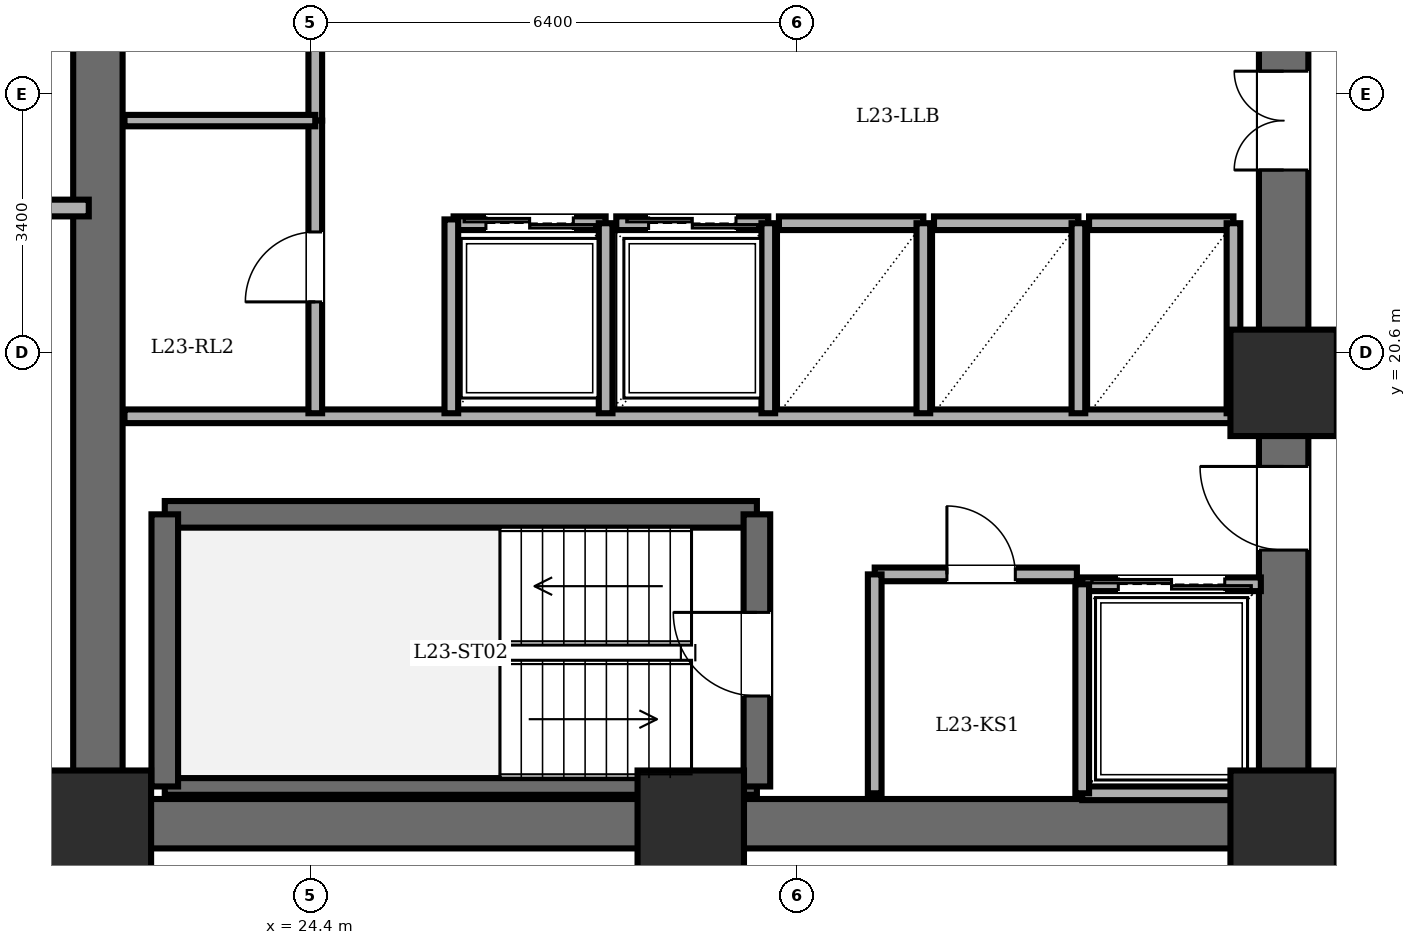
"""IFC4 building model, lengths in metres.
Left out: names, types, materials, properties, quantities, classifications, styles, units other than length and angle.
Written with IfcOpenShell. Run it as: python <this file> out.ifc"""

import sys

from ifc_helpers import new_model, si_unit, direction, frame, frame_2d, origin, origin_2d, place, context, subcontext, project, spatial, rectangle, extrude, element, fill, save


model = new_model("IFC4")
c1 = context("Model", 3, precision=1e-05, world=origin(), true_north=direction((0.0, 1.0)))
c2 = subcontext(c1, "Body", "Model", "MODEL_VIEW")
j1 = project(units=[si_unit("LENGTHUNIT", "METRE"), si_unit("PLANEANGLEUNIT", "RADIAN")], contexts=[c1])
p1 = place(None, origin())
s1 = spatial("IfcSite", under=j1, at=p1, CompositionType="ELEMENT")
p2 = place(p1, origin())
s2 = spatial("IfcBuilding", under=s1, at=p2, CompositionType="ELEMENT")
p3 = place(p2, frame((0.0, 0.0, 89.9)))
s3 = spatial("IfcBuildingStorey", under=s2, at=p3, CompositionType="ELEMENT", Elevation=89.9)
for number, where, z_axis, x_axis in (
    (1, (21.6, 14.4, 0.0), (0.0, 0.0, 1.0), (1.0, 0.0, 0.0)),
    (2, (29.4, 14.4, 0.0), (0.0, 0.0, 1.0), (1.0, 0.0, 0.0)),
    (3, (37.2, 14.4, 0.0), (0.0, 0.0, 1.0), (1.0, 0.0, 0.0)),
    (4, (37.2, 20.2, 0.0), (0.0, 0.0, 1.0), (1.0, 0.0, 0.0)),
):
    element("IfcColumn", number, at=place(p3, frame(where, z_axis=z_axis, x_axis=x_axis)), inside=s3, PredefinedType="COLUMN", context=c2, shape_type="SweptSolid", body=[
        extrude(rectangle(XDim=1.4, YDim=1.4, at=origin_2d()), origin(), (0.0, 0.0, 1.0), 3.6),
    ])
p4 = place(p3, frame((21.6, 14.4, 0.0), z_axis=(0.0, 0.0, 1.0), x_axis=(0.0, 1.0, 0.0)))
e5 = element("IfcWall", 5, at=p4, inside=s3, PredefinedType="SHEAR", context=c2, shape_type="SweptSolid", body=[
    extrude(rectangle(XDim=19.2, YDim=0.65, at=frame_2d((9.6, 0.0))), origin(), (0.0, 0.0, 1.0), 3.4),
])
p5 = place(p3, frame((37.2, 14.4, 0.0), z_axis=(0.0, 0.0, 1.0), x_axis=(-1.0, 0.0, 0.0)))
e6 = element("IfcWall", 6, at=p5, inside=s3, PredefinedType="SHEAR", context=c2, shape_type="SweptSolid", body=[
    extrude(rectangle(XDim=15.6, YDim=0.65, at=frame_2d((7.8, 0.0))), origin(), (0.0, 0.0, 1.0), 3.4),
])
p6 = place(p3, frame((37.2, 14.4, 0.0), z_axis=(0.0, 0.0, 1.0), x_axis=(0.0, 1.0, 0.0)))
e7 = element("IfcWall", 7, at=p6, inside=s3, PredefinedType="SHEAR", context=c2, shape_type="SweptSolid", body=[
    extrude(rectangle(XDim=19.2, YDim=0.65, at=frame_2d((9.6, 0.0))), origin(), (0.0, 0.0, 1.0), 3.4),
])
p7 = place(p6, frame((15.8, 0.0, 0.0)))
e8 = element("IfcOpeningElement", 8, at=p7, cuts=e7, PredefinedType="OPENING", context=c2, shape_type="SweptSolid", body=[
    extrude(rectangle(XDim=1.15, YDim=2.15, at=frame_2d((0.575, 1.075))), frame((0.0, 0.335, 0.0), z_axis=(0.0, -1.0, 0.0), x_axis=(1.0, 0.0, 0.0)), (0.0, 0.0, 1.0), 0.67),
])
p8 = place(p6, frame((3.6, 0.0, 0.0)))
e9 = element("IfcOpeningElement", 9, at=p8, cuts=e7, PredefinedType="OPENING", context=c2, shape_type="SweptSolid", body=[
    extrude(rectangle(XDim=1.1, YDim=2.15, at=frame_2d((0.55, 1.075))), frame((0.0, 0.335, 0.0), z_axis=(0.0, -1.0, 0.0), x_axis=(1.0, 0.0, 0.0)), (0.0, 0.0, 1.0), 0.67),
])
p9 = place(p6, frame((8.6, 0.0, 0.0)))
e10 = element("IfcOpeningElement", 10, at=p9, cuts=e7, PredefinedType="OPENING", context=c2, shape_type="SweptSolid", body=[
    extrude(rectangle(XDim=1.3, YDim=2.2, at=frame_2d((0.65, 1.1))), frame((0.0, 0.335, 0.0), z_axis=(0.0, -1.0, 0.0), x_axis=(1.0, 0.0, 0.0)), (0.0, 0.0, 1.0), 0.67),
])
p10 = place(p3, frame((22.48, 18.47, 0.0), z_axis=(0.0, 0.0, 1.0), x_axis=(1.0, 0.0, 0.0)))
e11 = element("IfcWall", 11, at=p10, inside=s3, PredefinedType="SOLIDWALL", context=c2, shape_type="SweptSolid", body=[
    extrude(rectangle(XDim=7.79, YDim=0.35, at=frame_2d((3.895, 0.0))), origin(), (0.0, 0.0, 1.0), 3.4),
])
p11 = place(p3, frame((22.48, 14.89, 0.0), z_axis=(0.0, 0.0, 1.0), x_axis=(1.0, 0.0, 0.0)))
e12 = element("IfcWall", 12, at=p11, inside=s3, PredefinedType="PARTITIONING", context=c2, shape_type="SweptSolid", body=[
    extrude(rectangle(XDim=7.79, YDim=0.22, at=frame_2d((3.895, 0.0))), origin(), (0.0, 0.0, 1.0), 3.4),
])
p12 = place(p3, frame((22.48, 14.89, 0.0), z_axis=(0.0, 0.0, 1.0), x_axis=(0.0, 1.0, 0.0)))
e13 = element("IfcWall", 13, at=p12, inside=s3, PredefinedType="SOLIDWALL", context=c2, shape_type="SweptSolid", body=[
    extrude(rectangle(XDim=3.58, YDim=0.35, at=frame_2d((1.79, 0.0))), origin(), (0.0, 0.0, 1.0), 3.4),
])
p13 = place(p3, frame((30.27, 14.89, 0.0), z_axis=(0.0, 0.0, 1.0), x_axis=(0.0, 1.0, 0.0)))
e14 = element("IfcWall", 14, at=p13, inside=s3, PredefinedType="SOLIDWALL", context=c2, shape_type="SweptSolid", body=[
    extrude(rectangle(XDim=3.58, YDim=0.35, at=frame_2d((1.79, 0.0))), origin(), (0.0, 0.0, 1.0), 3.4),
])
p14 = place(p13, frame((1.19, 0.0, 0.0)))
e15 = element("IfcOpeningElement", 15, at=p14, cuts=e14, PredefinedType="OPENING", context=c2, shape_type="SweptSolid", body=[
    extrude(rectangle(XDim=1.1, YDim=2.15, at=frame_2d((0.55, 1.075))), frame((0.0, 0.185, 0.0), z_axis=(0.0, -1.0, 0.0), x_axis=(1.0, 0.0, 0.0)), (0.0, 0.0, 1.0), 0.37),
])
p15 = place(p3, frame((21.95, 19.76, 0.0), z_axis=(0.0, 0.0, 1.0), x_axis=(1.0, 0.0, 0.0)))
e16 = element("IfcWall", 16, at=p15, inside=s3, PredefinedType="PARTITIONING", context=c2, shape_type="SweptSolid", body=[
    extrude(rectangle(XDim=14.87, YDim=0.18, at=frame_2d((7.435, 0.0))), origin(), (0.0, 0.0, 1.0), 3.4),
])
p16 = place(p3, frame((31.82, 17.68, 0.0), z_axis=(0.0, 0.0, 1.0), x_axis=(1.0, 0.0, 0.0)))
e17 = element("IfcWall", 17, at=p16, inside=s3, PredefinedType="PARTITIONING", context=c2, shape_type="SweptSolid", body=[
    extrude(rectangle(XDim=2.66, YDim=0.18, at=frame_2d((1.33, 0.0))), origin(), (0.0, 0.0, 1.0), 3.4),
])
p17 = place(p16, frame((0.95, 0.0, 0.0)))
e18 = element("IfcOpeningElement", 18, at=p17, cuts=e17, PredefinedType="OPENING", context=c2, shape_type="SweptSolid", body=[
    extrude(rectangle(XDim=0.9, YDim=2.05, at=frame_2d((0.45, 1.025))), frame((0.0, 0.1, 0.0), z_axis=(0.0, -1.0, 0.0), x_axis=(1.0, 0.0, 0.0)), (0.0, 0.0, 1.0), 0.2),
])
p18 = place(p3, frame((31.82, 14.8, 0.0), z_axis=(0.0, 0.0, 1.0), x_axis=(0.0, 1.0, 0.0)))
e19 = element("IfcWall", 19, at=p18, inside=s3, PredefinedType="PARTITIONING", context=c2, shape_type="SweptSolid", body=[
    extrude(rectangle(XDim=2.88, YDim=0.18, at=frame_2d((1.44, 0.0))), origin(), (0.0, 0.0, 1.0), 3.4),
])
p19 = place(p3, frame((34.55, 17.55, 0.0), z_axis=(0.0, 0.0, 1.0), x_axis=(1.0, 0.0, 0.0)))
e20 = element("IfcWall", 20, at=p19, inside=s3, PredefinedType="PARTITIONING", context=c2, shape_type="SweptSolid", body=[
    extrude(rectangle(XDim=2.35, YDim=0.18, at=frame_2d((1.175, 0.0))), origin(), (0.0, 0.0, 1.0), 3.4),
])
p20 = place(p19, frame((0.475, 0.0, 0.0)))
e21 = element("IfcOpeningElement", 21, at=p20, cuts=e20, PredefinedType="OPENING", context=c2, shape_type="SweptSolid", body=[
    extrude(rectangle(XDim=1.4, YDim=2.3, at=frame_2d((0.7, 1.15))), frame((0.0, 0.1, 0.0), z_axis=(0.0, -1.0, 0.0), x_axis=(1.0, 0.0, 0.0)), (0.0, 0.0, 1.0), 0.2),
])
p21 = place(p3, frame((36.9, 14.8, 0.0), z_axis=(0.0, 0.0, 1.0), x_axis=(-1.0, 0.0, 0.0)))
e22 = element("IfcWall", 22, at=p21, inside=s3, PredefinedType="PARTITIONING", context=c2, shape_type="SweptSolid", body=[
    extrude(rectangle(XDim=2.35, YDim=0.18, at=frame_2d((1.175, 0.0))), origin(), (0.0, 0.0, 1.0), 3.4),
])
p22 = place(p3, frame((34.55, 17.55, 0.0), z_axis=(0.0, 0.0, 1.0), x_axis=(0.0, -1.0, 0.0)))
e23 = element("IfcWall", 23, at=p22, inside=s3, PredefinedType="PARTITIONING", context=c2, shape_type="SweptSolid", body=[
    extrude(rectangle(XDim=2.75, YDim=0.18, at=frame_2d((1.375, 0.0))), origin(), (0.0, 0.0, 1.0), 3.4),
])
p23 = place(p3, frame((26.28, 22.3, 0.0), z_axis=(0.0, 0.0, 1.0), x_axis=(1.0, 0.0, 0.0)))
e24 = element("IfcWall", 24, at=p23, inside=s3, PredefinedType="PARTITIONING", context=c2, shape_type="SweptSolid", body=[
    extrude(rectangle(XDim=2.0, YDim=0.18, at=frame_2d((1.0, 0.0))), origin(), (0.0, 0.0, 1.0), 3.4),
])
p24 = place(p23, frame((0.425, 0.0, 0.0)))
e25 = element("IfcOpeningElement", 25, at=p24, cuts=e24, PredefinedType="OPENING", context=c2, shape_type="SweptSolid", body=[
    extrude(rectangle(XDim=1.15, YDim=2.2, at=frame_2d((0.575, 1.1))), frame((0.0, 0.1, 0.0), z_axis=(0.0, -1.0, 0.0), x_axis=(1.0, 0.0, 0.0)), (0.0, 0.0, 1.0), 0.2),
])
p25 = place(p3, frame((28.28, 19.8, 0.0), z_axis=(0.0, 0.0, 1.0), x_axis=(0.0, 1.0, 0.0)))
e26 = element("IfcWall", 26, at=p25, inside=s3, PredefinedType="PARTITIONING", context=c2, shape_type="SweptSolid", body=[
    extrude(rectangle(XDim=2.5, YDim=0.18, at=frame_2d((1.25, 0.0))), origin(), (0.0, 0.0, 1.0), 3.4),
])
p26 = place(p3, frame((28.42, 22.3, 0.0), z_axis=(0.0, 0.0, 1.0), x_axis=(1.0, 0.0, 0.0)))
e27 = element("IfcWall", 27, at=p26, inside=s3, PredefinedType="PARTITIONING", context=c2, shape_type="SweptSolid", body=[
    extrude(rectangle(XDim=2.0, YDim=0.18, at=frame_2d((1.0, 0.0))), origin(), (0.0, 0.0, 1.0), 3.4),
])
p27 = place(p26, frame((0.425, 0.0, 0.0)))
e28 = element("IfcOpeningElement", 28, at=p27, cuts=e27, PredefinedType="OPENING", context=c2, shape_type="SweptSolid", body=[
    extrude(rectangle(XDim=1.15, YDim=2.2, at=frame_2d((0.575, 1.1))), frame((0.0, 0.1, 0.0), z_axis=(0.0, -1.0, 0.0), x_axis=(1.0, 0.0, 0.0)), (0.0, 0.0, 1.0), 0.2),
])
p28 = place(p3, frame((30.42, 19.8, 0.0), z_axis=(0.0, 0.0, 1.0), x_axis=(0.0, 1.0, 0.0)))
e29 = element("IfcWall", 29, at=p28, inside=s3, PredefinedType="PARTITIONING", context=c2, shape_type="SweptSolid", body=[
    extrude(rectangle(XDim=2.5, YDim=0.18, at=frame_2d((1.25, 0.0))), origin(), (0.0, 0.0, 1.0), 3.4),
])
p29 = place(p3, frame((30.56, 22.3, 0.0), z_axis=(0.0, 0.0, 1.0), x_axis=(1.0, 0.0, 0.0)))
e30 = element("IfcWall", 30, at=p29, inside=s3, PredefinedType="PARTITIONING", context=c2, shape_type="SweptSolid", body=[
    extrude(rectangle(XDim=1.9, YDim=0.18, at=frame_2d((0.95, 0.0))), origin(), (0.0, 0.0, 1.0), 3.4),
])
p30 = place(p3, frame((32.46, 19.8, 0.0), z_axis=(0.0, 0.0, 1.0), x_axis=(0.0, 1.0, 0.0)))
e31 = element("IfcWall", 31, at=p30, inside=s3, PredefinedType="PARTITIONING", context=c2, shape_type="SweptSolid", body=[
    extrude(rectangle(XDim=2.5, YDim=0.18, at=frame_2d((1.25, 0.0))), origin(), (0.0, 0.0, 1.0), 3.4),
])
p31 = place(p3, frame((32.6, 22.3, 0.0), z_axis=(0.0, 0.0, 1.0), x_axis=(1.0, 0.0, 0.0)))
e32 = element("IfcWall", 32, at=p31, inside=s3, PredefinedType="PARTITIONING", context=c2, shape_type="SweptSolid", body=[
    extrude(rectangle(XDim=1.9, YDim=0.18, at=frame_2d((0.95, 0.0))), origin(), (0.0, 0.0, 1.0), 3.4),
])
p32 = place(p3, frame((34.5, 19.8, 0.0), z_axis=(0.0, 0.0, 1.0), x_axis=(0.0, 1.0, 0.0)))
e33 = element("IfcWall", 33, at=p32, inside=s3, PredefinedType="PARTITIONING", context=c2, shape_type="SweptSolid", body=[
    extrude(rectangle(XDim=2.5, YDim=0.18, at=frame_2d((1.25, 0.0))), origin(), (0.0, 0.0, 1.0), 3.4),
])
p33 = place(p3, frame((34.64, 22.3, 0.0), z_axis=(0.0, 0.0, 1.0), x_axis=(1.0, 0.0, 0.0)))
e34 = element("IfcWall", 34, at=p33, inside=s3, PredefinedType="PARTITIONING", context=c2, shape_type="SweptSolid", body=[
    extrude(rectangle(XDim=1.9, YDim=0.18, at=frame_2d((0.95, 0.0))), origin(), (0.0, 0.0, 1.0), 3.4),
])
p34 = place(p3, frame((36.54, 19.8, 0.0), z_axis=(0.0, 0.0, 1.0), x_axis=(0.0, 1.0, 0.0)))
e35 = element("IfcWall", 35, at=p34, inside=s3, PredefinedType="PARTITIONING", context=c2, shape_type="SweptSolid", body=[
    extrude(rectangle(XDim=2.5, YDim=0.18, at=frame_2d((1.25, 0.0))), origin(), (0.0, 0.0, 1.0), 3.4),
])
p35 = place(p3, frame((24.46, 23.65, 0.0), z_axis=(0.0, 0.0, 1.0), x_axis=(0.0, 1.0, 0.0)))
e36 = element("IfcWall", 36, at=p35, inside=s3, PredefinedType="PARTITIONING", context=c2, shape_type="SweptSolid", body=[
    extrude(rectangle(XDim=3.85, YDim=0.18, at=frame_2d((1.925, 0.0))), origin(), (0.0, 0.0, 1.0), 3.4),
])
p36 = place(p35, frame((1.465, 0.0, 0.0)))
e37 = element("IfcOpeningElement", 37, at=p36, cuts=e36, PredefinedType="OPENING", context=c2, shape_type="SweptSolid", body=[
    extrude(rectangle(XDim=0.92, YDim=2.1, at=frame_2d((0.46, 1.05))), frame((0.0, 0.1, 0.0), z_axis=(0.0, -1.0, 0.0), x_axis=(1.0, 0.0, 0.0)), (0.0, 0.0, 1.0), 0.2),
])
p37 = place(p3, frame((24.46, 19.8, 0.0), z_axis=(0.0, 0.0, 1.0), x_axis=(0.0, 1.0, 0.0)))
e38 = element("IfcWall", 38, at=p37, inside=s3, PredefinedType="PARTITIONING", context=c2, shape_type="SweptSolid", body=[
    extrude(rectangle(XDim=3.85, YDim=0.18, at=frame_2d((1.925, 0.0))), origin(), (0.0, 0.0, 1.0), 3.4),
])
p38 = place(p37, frame((1.465, 0.0, 0.0)))
e39 = element("IfcOpeningElement", 39, at=p38, cuts=e38, PredefinedType="OPENING", context=c2, shape_type="SweptSolid", body=[
    extrude(rectangle(XDim=0.92, YDim=2.1, at=frame_2d((0.46, 1.05))), frame((0.0, 0.1, 0.0), z_axis=(0.0, -1.0, 0.0), x_axis=(1.0, 0.0, 0.0)), (0.0, 0.0, 1.0), 0.2),
])
p39 = place(p3, frame((21.95, 23.65, 0.0), z_axis=(0.0, 0.0, 1.0), x_axis=(1.0, 0.0, 0.0)))
e40 = element("IfcWall", 40, at=p39, inside=s3, PredefinedType="PARTITIONING", context=c2, shape_type="SweptSolid", body=[
    extrude(rectangle(XDim=2.51, YDim=0.15, at=frame_2d((1.255, 0.0))), origin(), (0.0, 0.0, 1.0), 3.4),
])
p40 = place(p3, frame((26.25, 19.8, 0.0), z_axis=(0.0, 0.0, 1.0), x_axis=(0.0, 1.0, 0.0)))
e41 = element("IfcWall", 41, at=p40, inside=s3, PredefinedType="PARTITIONING", context=c2, shape_type="SweptSolid", body=[
    extrude(rectangle(XDim=2.55, YDim=0.18, at=frame_2d((1.275, 0.0))), origin(), (0.0, 0.0, 1.0), 3.4),
])
p41 = place(p3, frame((8.8, 14.18, 0.0), z_axis=(0.0, 0.0, 1.0), x_axis=(1.0, 0.0, 0.0)))
e42 = element("IfcWall", 42, at=p41, inside=s3, PredefinedType="PARTITIONING", context=c2, shape_type="SweptSolid", body=[
    extrude(rectangle(XDim=12.68, YDim=0.22, at=frame_2d((6.34, 0.0))), origin(), (0.0, 0.0, 1.0), 3.4),
])
p42 = place(p41, frame((6.18, 0.0, 0.0)))
e43 = element("IfcOpeningElement", 43, at=p42, cuts=e42, PredefinedType="OPENING", context=c2, shape_type="SweptSolid", body=[
    extrude(rectangle(XDim=1.0, YDim=2.15, at=frame_2d((0.5, 1.075))), frame((0.0, 0.12, 0.0), z_axis=(0.0, -1.0, 0.0), x_axis=(1.0, 0.0, 0.0)), (0.0, 0.0, 1.0), 0.24),
])
p43 = place(p3, frame((8.8, 22.5, 0.0), z_axis=(0.0, 0.0, 1.0), x_axis=(1.0, 0.0, 0.0)))
e44 = element("IfcWall", 44, at=p43, inside=s3, PredefinedType="PARTITIONING", context=c2, shape_type="SweptSolid", body=[
    extrude(rectangle(XDim=12.68, YDim=0.22, at=frame_2d((6.34, 0.0))), origin(), (0.0, 0.0, 1.0), 3.4),
])
p44 = place(p14, origin())
e45 = element("IfcDoor", 45, at=p44, inside=s3, OperationType="SINGLE_SWING_RIGHT", PredefinedType="DOOR", context=c2, shape_type="SweptSolid", body=[
    extrude(rectangle(XDim=1.1, YDim=2.15, at=frame_2d((0.55, 1.075))), frame((0.0, 0.025, 0.0), z_axis=(0.0, -1.0, 0.0), x_axis=(1.0, 0.0, 0.0)), (0.0, 0.0, 1.0), 0.05),
])
fill(e15, e45)
p45 = place(p8, origin())
e46 = element("IfcDoor", 46, at=p45, inside=s3, OperationType="SINGLE_SWING_RIGHT", PredefinedType="DOOR", context=c2, shape_type="SweptSolid", body=[
    extrude(rectangle(XDim=1.1, YDim=2.15, at=frame_2d((0.55, 1.075))), frame((0.0, 0.025, 0.0), z_axis=(0.0, -1.0, 0.0), x_axis=(1.0, 0.0, 0.0)), (0.0, 0.0, 1.0), 0.05),
])
fill(e9, e46)
p46 = place(p17, origin())
e47 = element("IfcDoor", 47, at=p46, inside=s3, OperationType="SINGLE_SWING_LEFT", PredefinedType="DOOR", context=c2, shape_type="SweptSolid", body=[
    extrude(rectangle(XDim=0.9, YDim=2.05, at=frame_2d((0.45, 1.025))), frame((0.0, 0.025, 0.0), z_axis=(0.0, -1.0, 0.0), x_axis=(1.0, 0.0, 0.0)), (0.0, 0.0, 1.0), 0.05),
])
fill(e18, e47)
p47 = place(p20, origin())
e48 = element("IfcDoor", 48, at=p47, inside=s3, OperationType="DOUBLE_DOOR_SLIDING", PredefinedType="DOOR", context=c2, shape_type="SweptSolid", body=[
    extrude(rectangle(XDim=1.4, YDim=2.3, at=frame_2d((0.7, 1.15))), frame((0.0, 0.025, 0.0), z_axis=(0.0, -1.0, 0.0), x_axis=(1.0, 0.0, 0.0)), (0.0, 0.0, 1.0), 0.05),
])
fill(e21, e48)
p48 = place(p24, origin())
e49 = element("IfcDoor", 49, at=p48, inside=s3, OperationType="DOUBLE_DOOR_SLIDING", PredefinedType="DOOR", context=c2, shape_type="SweptSolid", body=[
    extrude(rectangle(XDim=1.15, YDim=2.2, at=frame_2d((0.575, 1.1))), frame((0.0, 0.025, 0.0), z_axis=(0.0, -1.0, 0.0), x_axis=(1.0, 0.0, 0.0)), (0.0, 0.0, 1.0), 0.05),
])
fill(e25, e49)
p49 = place(p27, origin())
e50 = element("IfcDoor", 50, at=p49, inside=s3, OperationType="DOUBLE_DOOR_SLIDING", PredefinedType="DOOR", context=c2, shape_type="SweptSolid", body=[
    extrude(rectangle(XDim=1.15, YDim=2.2, at=frame_2d((0.575, 1.1))), frame((0.0, 0.025, 0.0), z_axis=(0.0, -1.0, 0.0), x_axis=(1.0, 0.0, 0.0)), (0.0, 0.0, 1.0), 0.05),
])
fill(e28, e50)
p50 = place(p38, origin())
e51 = element("IfcDoor", 51, at=p50, inside=s3, OperationType="SINGLE_SWING_LEFT", PredefinedType="DOOR", context=c2, shape_type="SweptSolid", body=[
    extrude(rectangle(XDim=0.92, YDim=2.1, at=frame_2d((0.46, 1.05))), frame((0.0, 0.025, 0.0), z_axis=(0.0, -1.0, 0.0), x_axis=(1.0, 0.0, 0.0)), (0.0, 0.0, 1.0), 0.05),
])
fill(e39, e51)
p51 = place(p9, origin())
e52 = element("IfcDoor", 52, at=p51, inside=s3, OperationType="DOUBLE_DOOR_SINGLE_SWING", PredefinedType="DOOR", context=c2, shape_type="SweptSolid", body=[
    extrude(rectangle(XDim=1.3, YDim=2.2, at=frame_2d((0.65, 1.1))), frame((0.0, 0.025, 0.0), z_axis=(0.0, -1.0, 0.0), x_axis=(1.0, 0.0, 0.0)), (0.0, 0.0, 1.0), 0.05),
])
fill(e10, e52)
save(model, sys.argv[1])
